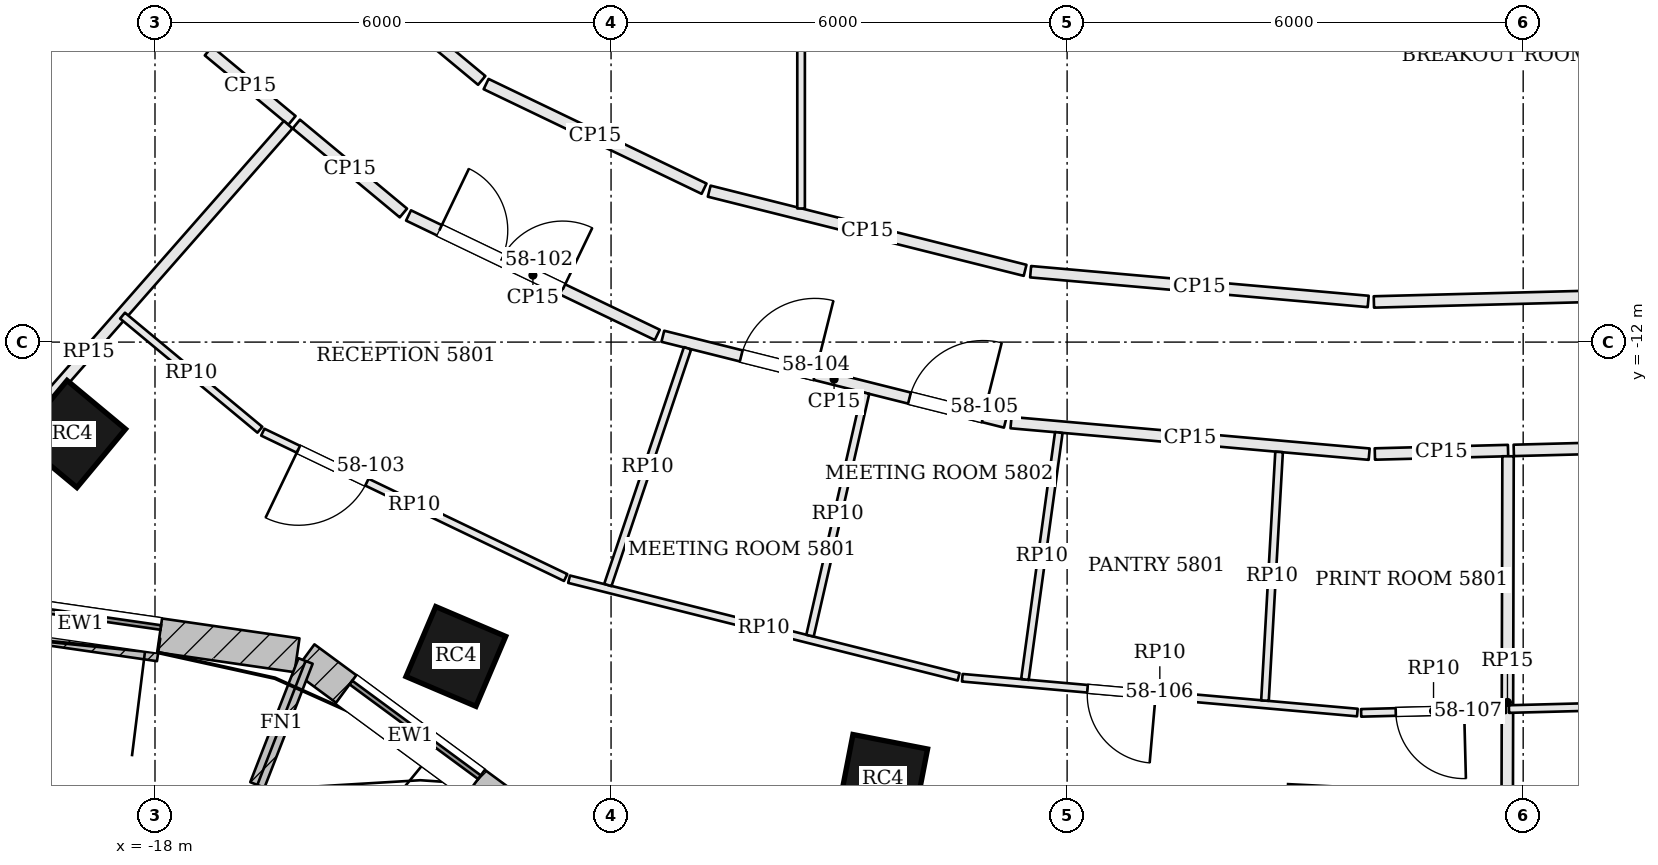
"""IFC4 building model, lengths in metres.
Left out: names, types, materials, properties, quantities, classifications, styles, units other than length and angle.
Written with IfcOpenShell. Run it as: python <this file> out.ifc"""

import sys

from ifc_helpers import new_model, si_unit, direction, frame, frame_2d, origin, origin_2d, place, context, subcontext, project, spatial, rectangle, extrude, element, fill, save


model = new_model("IFC4")
c1 = context("Model", 3, precision=1e-05, world=origin(), true_north=direction((0.0, 1.0)))
c2 = subcontext(c1, "Body", "Model", "MODEL_VIEW")
j1 = project(units=[si_unit("LENGTHUNIT", "METRE"), si_unit("PLANEANGLEUNIT", "RADIAN")], contexts=[c1])
p1 = place(None, origin())
s1 = spatial("IfcSite", under=j1, at=p1, CompositionType="ELEMENT")
p2 = place(p1, origin())
s2 = spatial("IfcBuilding", under=s1, at=p2, CompositionType="ELEMENT")
p3 = place(p2, frame((0.0, 0.0, 237.0)))
s3 = spatial("IfcBuildingStorey", under=s2, at=p3, CompositionType="ELEMENT", Elevation=237.0)
for number, where, z_axis, x_axis in (
    (1, (-19.092, -13.209, 0.0), (0.0, 0.0, 1.0), (0.769, -0.639, 0.0)),
    (2, (-14.042, -16.136, 0.0), (0.0, 0.0, 1.0), (0.92, -0.392, 0.0)),
    (3, (-8.422, -17.749, 0.0), (0.0, 0.0, 1.0), (0.982, -0.191, 0.0)),
):
    element("IfcColumn", number, at=place(p3, frame(where, z_axis=z_axis, x_axis=x_axis)), inside=s3, PredefinedType="COLUMN", context=c2, shape_type="SweptSolid", body=[
        extrude(rectangle(XDim=1.0, YDim=1.0, at=origin_2d()), origin(), (0.0, 0.0, 1.0), 3.9),
    ])
p4 = place(p3, frame((-21.825, -15.297, 0.0), z_axis=(0.0, 0.0, 1.0), x_axis=(0.98971474215, -0.143054986527, 0.0)))
e4 = element("IfcWall", 4, at=p4, inside=s3, PredefinedType="SOLIDWALL", context=c2, shape_type="SweptSolid", body=[
    extrude(rectangle(XDim=5.753, YDim=0.45, at=frame_2d((2.876, 0.0))), origin(), (0.0, 0.0, 1.0), 3.7),
])
p5 = place(p4, frame((1.826, 0.0, 0.9)))
e5 = element("IfcOpeningElement", 5, at=p5, cuts=e4, PredefinedType="OPENING", context=c2, shape_type="SweptSolid", body=[
    extrude(rectangle(XDim=2.1, YDim=2.3, at=frame_2d((1.05, 1.15))), frame((0.0, 0.235, 0.0), z_axis=(0.0, -1.0, 0.0), x_axis=(1.0, 0.0, 0.0)), (0.0, 0.0, 1.0), 0.47),
])
p6 = place(p3, frame((-16.036, -16.158, 0.0), z_axis=(0.0, 0.0, 1.0), x_axis=(0.805181432967, -0.593028549064, 0.0)))
e6 = element("IfcWall", 6, at=p6, inside=s3, PredefinedType="SOLIDWALL", context=c2, shape_type="SweptSolid", body=[
    extrude(rectangle(XDim=3.469, YDim=0.45, at=frame_2d((1.734, 0.0))), origin(), (0.0, 0.0, 1.0), 3.7),
])
p7 = place(p6, frame((0.684, 0.0, 0.9)))
e7 = element("IfcOpeningElement", 7, at=p7, cuts=e6, PredefinedType="OPENING", context=c2, shape_type="SweptSolid", body=[
    extrude(rectangle(XDim=2.1, YDim=2.3, at=frame_2d((1.05, 1.15))), frame((0.0, 0.235, 0.0), z_axis=(0.0, -1.0, 0.0), x_axis=(1.0, 0.0, 0.0)), (0.0, 0.0, 1.0), 0.47),
])
p8 = place(p3, frame((-16.019, -16.195, 0.0), z_axis=(0.0, 0.0, 1.0), x_axis=(-0.362641522028, -0.931928713208, 0.0)))
e8 = element("IfcWall", 8, at=p8, inside=s3, PredefinedType="SOLIDWALL", context=c2, shape_type="SweptSolid", body=[
    extrude(rectangle(XDim=1.75, YDim=0.2, at=frame_2d((0.875, 0.0))), origin(), (0.0, 0.0, 1.0), 3.7),
])
p9 = place(p3, frame((-21.471, -15.541, 3.9), z_axis=(0.0, 0.0, 1.0), x_axis=(0.989713234374, -0.143065417571, 0.0)))
e9 = element("IfcWall", 9, at=p9, inside=s3, PredefinedType="PARAPET", context=c2, shape_type="SweptSolid", body=[
    extrude(rectangle(XDim=3.555, YDim=0.3, at=frame_2d((1.777, 0.0))), origin(), (0.0, 0.0, 1.0), 1.1),
])
p10 = place(p3, frame((-17.297, -8.171, 0.0), z_axis=(0.0, 0.0, 1.0), x_axis=(0.769229150867, -0.638973014654, 0.0)))
e10 = element("IfcWall", 10, at=p10, inside=s3, PredefinedType="PARTITIONING", context=c2, shape_type="SweptSolid", body=[
    extrude(rectangle(XDim=1.428, YDim=0.15, at=frame_2d((0.714, 0.0))), origin(), (0.0, 0.0, 1.0), 3.084),
])
p11 = place(p3, frame((-21.493, -15.114, 0.0), z_axis=(0.0, 0.0, 1.0), x_axis=(0.659784254939, 0.751455079785, 0.0)))
e11 = element("IfcWall", 11, at=p11, inside=s3, PredefinedType="PARTITIONING", context=c2, shape_type="SweptSolid", body=[
    extrude(rectangle(XDim=7.95, YDim=0.15, at=frame_2d((3.975, 0.0))), origin(), (0.0, 0.0, 1.0), 3.184),
])
p12 = place(p3, frame((-16.141, -9.131, 0.0), z_axis=(0.0, 0.0, 1.0), x_axis=(0.769225656115, -0.638977221796, 0.0)))
e12 = element("IfcWall", 12, at=p12, inside=s3, PredefinedType="PARTITIONING", context=c2, shape_type="SweptSolid", body=[
    extrude(rectangle(XDim=1.831, YDim=0.15, at=frame_2d((0.916, 0.0))), origin(), (0.0, 0.0, 1.0), 3.084),
])
p13 = place(p3, frame((-14.664, -10.334, 0.0), z_axis=(0.0, 0.0, 1.0), x_axis=(0.901507315282, -0.432763862278, 0.0)))
e13 = element("IfcWall", 13, at=p13, inside=s3, PredefinedType="PARTITIONING", context=c2, shape_type="SweptSolid", body=[
    extrude(rectangle(XDim=3.63, YDim=0.15, at=frame_2d((1.815, 0.0))), origin(), (0.0, 0.0, 1.0), 3.084),
])
p14 = place(p13, frame((0.45, 0.0, 0.0)))
e14 = element("IfcOpeningElement", 14, at=p14, cuts=e13, PredefinedType="OPENING", context=c2, shape_type="SweptSolid", body=[
    extrude(rectangle(XDim=1.8, YDim=2.1, at=frame_2d((0.9, 1.05))), frame((0.0, 0.085, 0.0), z_axis=(0.0, -1.0, 0.0), x_axis=(1.0, 0.0, 0.0)), (0.0, 0.0, 1.0), 0.17),
])
p15 = place(p3, frame((-11.319, -11.923, 0.0), z_axis=(0.0, 0.0, 1.0), x_axis=(0.969990815038, -0.243141561114, 0.0)))
e15 = element("IfcWall", 15, at=p15, inside=s3, PredefinedType="PARTITIONING", context=c2, shape_type="SweptSolid", body=[
    extrude(rectangle(XDim=4.645, YDim=0.15, at=frame_2d((2.323, 0.0))), origin(), (0.0, 0.0, 1.0), 3.084),
])
p16 = place(p15, frame((1.063, 0.0, 0.0)))
e16 = element("IfcOpeningElement", 16, at=p16, cuts=e15, PredefinedType="OPENING", context=c2, shape_type="SweptSolid", body=[
    extrude(rectangle(XDim=1.0, YDim=2.4, at=frame_2d((0.5, 1.2))), frame((0.0, 0.085, 0.0), z_axis=(0.0, -1.0, 0.0), x_axis=(1.0, 0.0, 0.0)), (0.0, 0.0, 1.0), 0.17),
])
p17 = place(p15, frame((3.345, 0.0, 0.0)))
e17 = element("IfcOpeningElement", 17, at=p17, cuts=e15, PredefinedType="OPENING", context=c2, shape_type="SweptSolid", body=[
    extrude(rectangle(XDim=1.0, YDim=2.4, at=frame_2d((0.5, 1.2))), frame((0.0, 0.085, 0.0), z_axis=(0.0, -1.0, 0.0), x_axis=(1.0, 0.0, 0.0)), (0.0, 0.0, 1.0), 0.17),
])
p18 = place(p3, frame((-6.738, -13.059, 0.0), z_axis=(0.0, 0.0, 1.0), x_axis=(0.996143527037, -0.087738666181, 0.0)))
e18 = element("IfcWall", 18, at=p18, inside=s3, PredefinedType="PARTITIONING", context=c2, shape_type="SweptSolid", body=[
    extrude(rectangle(XDim=4.73, YDim=0.15, at=frame_2d((2.365, 0.0))), origin(), (0.0, 0.0, 1.0), 3.084),
])
p19 = place(p3, frame((-1.951, -13.472, 0.0), z_axis=(0.0, 0.0, 1.0), x_axis=(0.999660729369, 0.026046615075, 0.0)))
e19 = element("IfcWall", 19, at=p19, inside=s3, PredefinedType="PARTITIONING", context=c2, shape_type="SweptSolid", body=[
    extrude(rectangle(XDim=1.753, YDim=0.15, at=frame_2d((0.876, 0.0))), origin(), (0.0, 0.0, 1.0), 3.084),
])
p20 = place(p3, frame((-0.214, -19.979, 0.0), z_axis=(0.0, 0.0, 1.0), x_axis=(0.002336970626, 0.99999726928, 0.0)))
e20 = element("IfcWall", 20, at=p20, inside=s3, PredefinedType="PARTITIONING", context=c2, shape_type="SweptSolid", body=[
    extrude(rectangle(XDim=6.477, YDim=0.15, at=frame_2d((3.239, 0.0))), origin(), (0.0, 0.0, 1.0), 3.184),
])
p21 = place(p3, frame((-0.124, -13.425, 0.0), z_axis=(0.0, 0.0, 1.0), x_axis=(0.999665011025, 0.025881764465, 0.0)))
e21 = element("IfcWall", 21, at=p21, inside=s3, PredefinedType="PARTITIONING", context=c2, shape_type="SweptSolid", body=[
    extrude(rectangle(XDim=5.047, YDim=0.15, at=frame_2d((2.523, 0.0))), origin(), (0.0, 0.0, 1.0), 3.084),
])
p22 = place(p21, frame((2.8, 0.0, 0.0)))
e22 = element("IfcOpeningElement", 22, at=p22, cuts=e21, PredefinedType="OPENING", context=c2, shape_type="SweptSolid", body=[
    extrude(rectangle(XDim=1.8, YDim=2.1, at=frame_2d((0.9, 1.05))), frame((0.0, 0.085, 0.0), z_axis=(0.0, -1.0, 0.0), x_axis=(1.0, 0.0, 0.0)), (0.0, 0.0, 1.0), 0.17),
])
p23 = place(p3, frame((4.645, -11.301, 0.0), z_axis=(0.0, 0.0, 1.0), x_axis=(-0.9996648469, -0.02588810291, 0.0)))
e23 = element("IfcWall", 23, at=p23, inside=s3, PredefinedType="PARTITIONING", context=c2, shape_type="SweptSolid", body=[
    extrude(rectangle(XDim=6.611, YDim=0.15, at=frame_2d((3.305, 0.0))), origin(), (0.0, 0.0, 1.0), 3.084),
])
p24 = place(p3, frame((-2.039, -11.465, 0.0), z_axis=(0.0, 0.0, 1.0), x_axis=(-0.996139855484, 0.087780341286, 0.0)))
e24 = element("IfcWall", 24, at=p24, inside=s3, PredefinedType="PARTITIONING", context=c2, shape_type="SweptSolid", body=[
    extrude(rectangle(XDim=4.458, YDim=0.15, at=frame_2d((2.229, 0.0))), origin(), (0.0, 0.0, 1.0), 3.084),
])
p25 = place(p3, frame((-6.553, -11.056, 0.0), z_axis=(0.0, 0.0, 1.0), x_axis=(-0.970004917182, 0.243085294995, 0.0)))
e25 = element("IfcWall", 25, at=p25, inside=s3, PredefinedType="PARTITIONING", context=c2, shape_type="SweptSolid", body=[
    extrude(rectangle(XDim=4.284, YDim=0.15, at=frame_2d((2.142, 0.0))), origin(), (0.0, 0.0, 1.0), 3.084),
])
p26 = place(p3, frame((-10.776, -9.982, 0.0), z_axis=(0.0, 0.0, 1.0), x_axis=(-0.901511079436, 0.432756020933, 0.0)))
e26 = element("IfcWall", 26, at=p26, inside=s3, PredefinedType="PARTITIONING", context=c2, shape_type="SweptSolid", body=[
    extrude(rectangle(XDim=3.181, YDim=0.15, at=frame_2d((1.59, 0.0))), origin(), (0.0, 0.0, 1.0), 3.084),
])
p27 = place(p3, frame((-13.702, -8.557, 0.0), z_axis=(0.0, 0.0, 1.0), x_axis=(-0.769221825067, 0.638981833733, 0.0)))
e27 = element("IfcWall", 27, at=p27, inside=s3, PredefinedType="PARTITIONING", context=c2, shape_type="SweptSolid", body=[
    extrude(rectangle(XDim=2.817, YDim=0.15, at=frame_2d((1.409, 0.0))), origin(), (0.0, 0.0, 1.0), 3.084),
])
p28 = place(p3, frame((-0.227, -16.829, 0.0), z_axis=(0.0, 0.0, 1.0), x_axis=(-0.99966500172, -0.025882123859, 0.0)))
e28 = element("IfcWall", 28, at=p28, inside=s3, PredefinedType="PARTITIONING", context=c2, shape_type="SweptSolid", body=[
    extrude(rectangle(XDim=1.906, YDim=0.1, at=frame_2d((0.953, 0.0))), origin(), (0.0, 0.0, 1.0), 3.084),
])
p29 = place(p28, frame((0.55, 0.0, 0.0)))
e29 = element("IfcOpeningElement", 29, at=p29, cuts=e28, PredefinedType="OPENING", context=c2, shape_type="SweptSolid", body=[
    extrude(rectangle(XDim=0.9, YDim=2.1, at=frame_2d((0.45, 1.05))), frame((0.0, 0.06, 0.0), z_axis=(0.0, -1.0, 0.0), x_axis=(1.0, 0.0, 0.0)), (0.0, 0.0, 1.0), 0.12),
])
p30 = place(p3, frame((-2.181, -16.874, 0.0), z_axis=(0.0, 0.0, 1.0), x_axis=(-0.996143934904, 0.087734035321, 0.0)))
e30 = element("IfcWall", 30, at=p30, inside=s3, PredefinedType="PARTITIONING", context=c2, shape_type="SweptSolid", body=[
    extrude(rectangle(XDim=5.218, YDim=0.1, at=frame_2d((2.609, 0.0))), origin(), (0.0, 0.0, 1.0), 3.084),
])
p31 = place(p30, frame((2.664, 0.0, 0.0)))
e31 = element("IfcOpeningElement", 31, at=p31, cuts=e30, PredefinedType="OPENING", context=c2, shape_type="SweptSolid", body=[
    extrude(rectangle(XDim=0.9, YDim=2.1, at=frame_2d((0.45, 1.05))), frame((0.0, 0.06, 0.0), z_axis=(0.0, -1.0, 0.0), x_axis=(1.0, 0.0, 0.0)), (0.0, 0.0, 1.0), 0.12),
])
p32 = place(p3, frame((-7.427, -16.404, 0.0), z_axis=(0.0, 0.0, 1.0), x_axis=(-0.970009158253, 0.243068370845, 0.0)))
e32 = element("IfcWall", 32, at=p32, inside=s3, PredefinedType="PARTITIONING", context=c2, shape_type="SweptSolid", body=[
    extrude(rectangle(XDim=5.283, YDim=0.1, at=frame_2d((2.642, 0.0))), origin(), (0.0, 0.0, 1.0), 3.084),
])
p33 = place(p3, frame((-12.597, -15.098, 0.0), z_axis=(0.0, 0.0, 1.0), x_axis=(-0.901514437286, 0.432749025839, 0.0)))
e33 = element("IfcWall", 33, at=p33, inside=s3, PredefinedType="PARTITIONING", context=c2, shape_type="SweptSolid", body=[
    extrude(rectangle(XDim=4.42, YDim=0.1, at=frame_2d((2.21, 0.0))), origin(), (0.0, 0.0, 1.0), 3.084),
])
p34 = place(p33, frame((2.9, 0.0, 0.0)))
e34 = element("IfcOpeningElement", 34, at=p34, cuts=e33, PredefinedType="OPENING", context=c2, shape_type="SweptSolid", body=[
    extrude(rectangle(XDim=1.0, YDim=2.1, at=frame_2d((0.5, 1.05))), frame((0.0, 0.06, 0.0), z_axis=(0.0, -1.0, 0.0), x_axis=(1.0, 0.0, 0.0)), (0.0, 0.0, 1.0), 0.12),
])
p35 = place(p3, frame((-16.62, -13.153, 0.0), z_axis=(0.0, 0.0, 1.0), x_axis=(-0.769217094577, 0.638987528369, 0.0)))
e35 = element("IfcWall", 35, at=p35, inside=s3, PredefinedType="PARTITIONING", context=c2, shape_type="SweptSolid", body=[
    extrude(rectangle(XDim=2.349, YDim=0.1, at=frame_2d((1.174, 0.0))), origin(), (0.0, 0.0, 1.0), 3.084),
])
p36 = place(p3, frame((-10.994, -12.082, 0.0), z_axis=(0.0, 0.0, 1.0), x_axis=(-0.319057304325, -0.947735425399, 0.0)))
e36 = element("IfcWall", 36, at=p36, inside=s3, PredefinedType="PARTITIONING", context=c2, shape_type="SweptSolid", body=[
    extrude(rectangle(XDim=3.286, YDim=0.1, at=frame_2d((1.643, 0.0))), origin(), (0.0, 0.0, 1.0), 3.084),
])
p37 = place(p3, frame((-8.652, -12.669, 0.0), z_axis=(0.0, 0.0, 1.0), x_axis=(-0.223144536662, -0.974785369073, 0.0)))
e37 = element("IfcWall", 37, at=p37, inside=s3, PredefinedType="PARTITIONING", context=c2, shape_type="SweptSolid", body=[
    extrude(rectangle(XDim=3.276, YDim=0.1, at=frame_2d((1.638, 0.0))), origin(), (0.0, 0.0, 1.0), 3.084),
])
p38 = place(p3, frame((-6.109, -13.19, 0.0), z_axis=(0.0, 0.0, 1.0), x_axis=(-0.135957093791, -0.990714726169, 0.0)))
e38 = element("IfcWall", 38, at=p38, inside=s3, PredefinedType="PARTITIONING", context=c2, shape_type="SweptSolid", body=[
    extrude(rectangle(XDim=3.279, YDim=0.1, at=frame_2d((1.64, 0.0))), origin(), (0.0, 0.0, 1.0), 3.084),
])
p39 = place(p3, frame((-3.211, -13.445, 0.0), z_axis=(0.0, 0.0, 1.0), x_axis=(-0.056703901856, -0.99839103938, 0.0)))
e39 = element("IfcWall", 39, at=p39, inside=s3, PredefinedType="PARTITIONING", context=c2, shape_type="SweptSolid", body=[
    extrude(rectangle(XDim=3.277, YDim=0.1, at=frame_2d((1.638, 0.0))), origin(), (0.0, 0.0, 1.0), 3.084),
])
p40 = place(p3, frame((5.214, -16.688, 0.0), z_axis=(0.0, 0.0, 1.0), x_axis=(-0.999664716631, -0.025893132747, 0.0)))
e40 = element("IfcWall", 40, at=p40, inside=s3, PredefinedType="PARTITIONING", context=c2, shape_type="SweptSolid", body=[
    extrude(rectangle(XDim=5.403, YDim=0.1, at=frame_2d((2.701, 0.0))), origin(), (0.0, 0.0, 1.0), 3.084),
])
p41 = place(p40, frame((2.55, 0.0, 0.0)))
e41 = element("IfcOpeningElement", 41, at=p41, cuts=e40, PredefinedType="OPENING", context=c2, shape_type="SweptSolid", body=[
    extrude(rectangle(XDim=1.0, YDim=2.1, at=frame_2d((0.5, 1.05))), frame((0.0, 0.06, 0.0), z_axis=(0.0, -1.0, 0.0), x_axis=(1.0, 0.0, 0.0)), (0.0, 0.0, 1.0), 0.12),
])
p42 = place(p3, frame((-9.5, -10.242, 0.0), z_axis=(0.0, 0.0, 1.0), x_axis=(0.0, 1.0, 0.0)))
e42 = element("IfcWall", 42, at=p42, inside=s3, PredefinedType="PARTITIONING", context=c2, shape_type="SweptSolid", body=[
    extrude(rectangle(XDim=5.167, YDim=0.1, at=frame_2d((2.583, 0.0))), origin(), (0.0, 0.0, 1.0), 3.084),
])
p43 = place(p5, origin())
e43 = element("IfcWindow", 43, at=p43, inside=s3, PartitioningType="SINGLE_PANEL", PredefinedType="WINDOW", context=c2, shape_type="SweptSolid", body=[
    extrude(rectangle(XDim=2.1, YDim=2.3, at=frame_2d((1.05, 1.15))), frame((0.0, 0.135, 0.0), z_axis=(0.0, -1.0, 0.0), x_axis=(1.0, 0.0, 0.0)), (0.0, 0.0, 1.0), 0.06),
])
fill(e5, e43)
p44 = place(p7, origin())
e44 = element("IfcWindow", 44, at=p44, inside=s3, PartitioningType="SINGLE_PANEL", PredefinedType="WINDOW", context=c2, shape_type="SweptSolid", body=[
    extrude(rectangle(XDim=2.1, YDim=2.3, at=frame_2d((1.05, 1.15))), frame((0.0, 0.135, 0.0), z_axis=(0.0, -1.0, 0.0), x_axis=(1.0, 0.0, 0.0)), (0.0, 0.0, 1.0), 0.06),
])
fill(e7, e44)
p45 = place(p14, origin())
e45 = element("IfcDoor", 45, at=p45, inside=s3, OperationType="DOUBLE_DOOR_SINGLE_SWING", PredefinedType="DOOR", context=c2, shape_type="SweptSolid", body=[
    extrude(rectangle(XDim=1.8, YDim=2.1, at=frame_2d((0.9, 1.05))), frame((0.0, 0.025, 0.0), z_axis=(0.0, -1.0, 0.0), x_axis=(1.0, 0.0, 0.0)), (0.0, 0.0, 1.0), 0.05),
])
fill(e14, e45)
p46 = place(p34, origin())
e46 = element("IfcDoor", 46, at=p46, inside=s3, OperationType="SINGLE_SWING_RIGHT", PredefinedType="DOOR", context=c2, shape_type="SweptSolid", body=[
    extrude(rectangle(XDim=1.0, YDim=2.1, at=frame_2d((0.5, 1.05))), frame((0.0, 0.025, 0.0), z_axis=(0.0, -1.0, 0.0), x_axis=(1.0, 0.0, 0.0)), (0.0, 0.0, 1.0), 0.05),
])
fill(e34, e46)
p47 = place(p16, origin())
e47 = element("IfcDoor", 47, at=p47, inside=s3, OperationType="SINGLE_SWING_RIGHT", PredefinedType="DOOR", context=c2, shape_type="SweptSolid", body=[
    extrude(rectangle(XDim=1.0, YDim=2.4, at=frame_2d((0.5, 1.2))), frame((0.0, 0.025, 0.0), z_axis=(0.0, -1.0, 0.0), x_axis=(1.0, 0.0, 0.0)), (0.0, 0.0, 1.0), 0.05),
])
fill(e16, e47)
p48 = place(p17, origin())
e48 = element("IfcDoor", 48, at=p48, inside=s3, OperationType="SINGLE_SWING_RIGHT", PredefinedType="DOOR", context=c2, shape_type="SweptSolid", body=[
    extrude(rectangle(XDim=1.0, YDim=2.4, at=frame_2d((0.5, 1.2))), frame((0.0, 0.025, 0.0), z_axis=(0.0, -1.0, 0.0), x_axis=(1.0, 0.0, 0.0)), (0.0, 0.0, 1.0), 0.05),
])
fill(e17, e48)
p49 = place(p31, origin())
e49 = element("IfcDoor", 49, at=p49, inside=s3, OperationType="SINGLE_SWING_LEFT", PredefinedType="DOOR", context=c2, shape_type="SweptSolid", body=[
    extrude(rectangle(XDim=0.9, YDim=2.1, at=frame_2d((0.45, 1.05))), frame((0.0, 0.025, 0.0), z_axis=(0.0, -1.0, 0.0), x_axis=(1.0, 0.0, 0.0)), (0.0, 0.0, 1.0), 0.05),
])
fill(e31, e49)
p50 = place(p29, origin())
e50 = element("IfcDoor", 50, at=p50, inside=s3, OperationType="SINGLE_SWING_LEFT", PredefinedType="DOOR", context=c2, shape_type="SweptSolid", body=[
    extrude(rectangle(XDim=0.9, YDim=2.1, at=frame_2d((0.45, 1.05))), frame((0.0, 0.025, 0.0), z_axis=(0.0, -1.0, 0.0), x_axis=(1.0, 0.0, 0.0)), (0.0, 0.0, 1.0), 0.05),
])
fill(e29, e50)
save(model, sys.argv[1])
